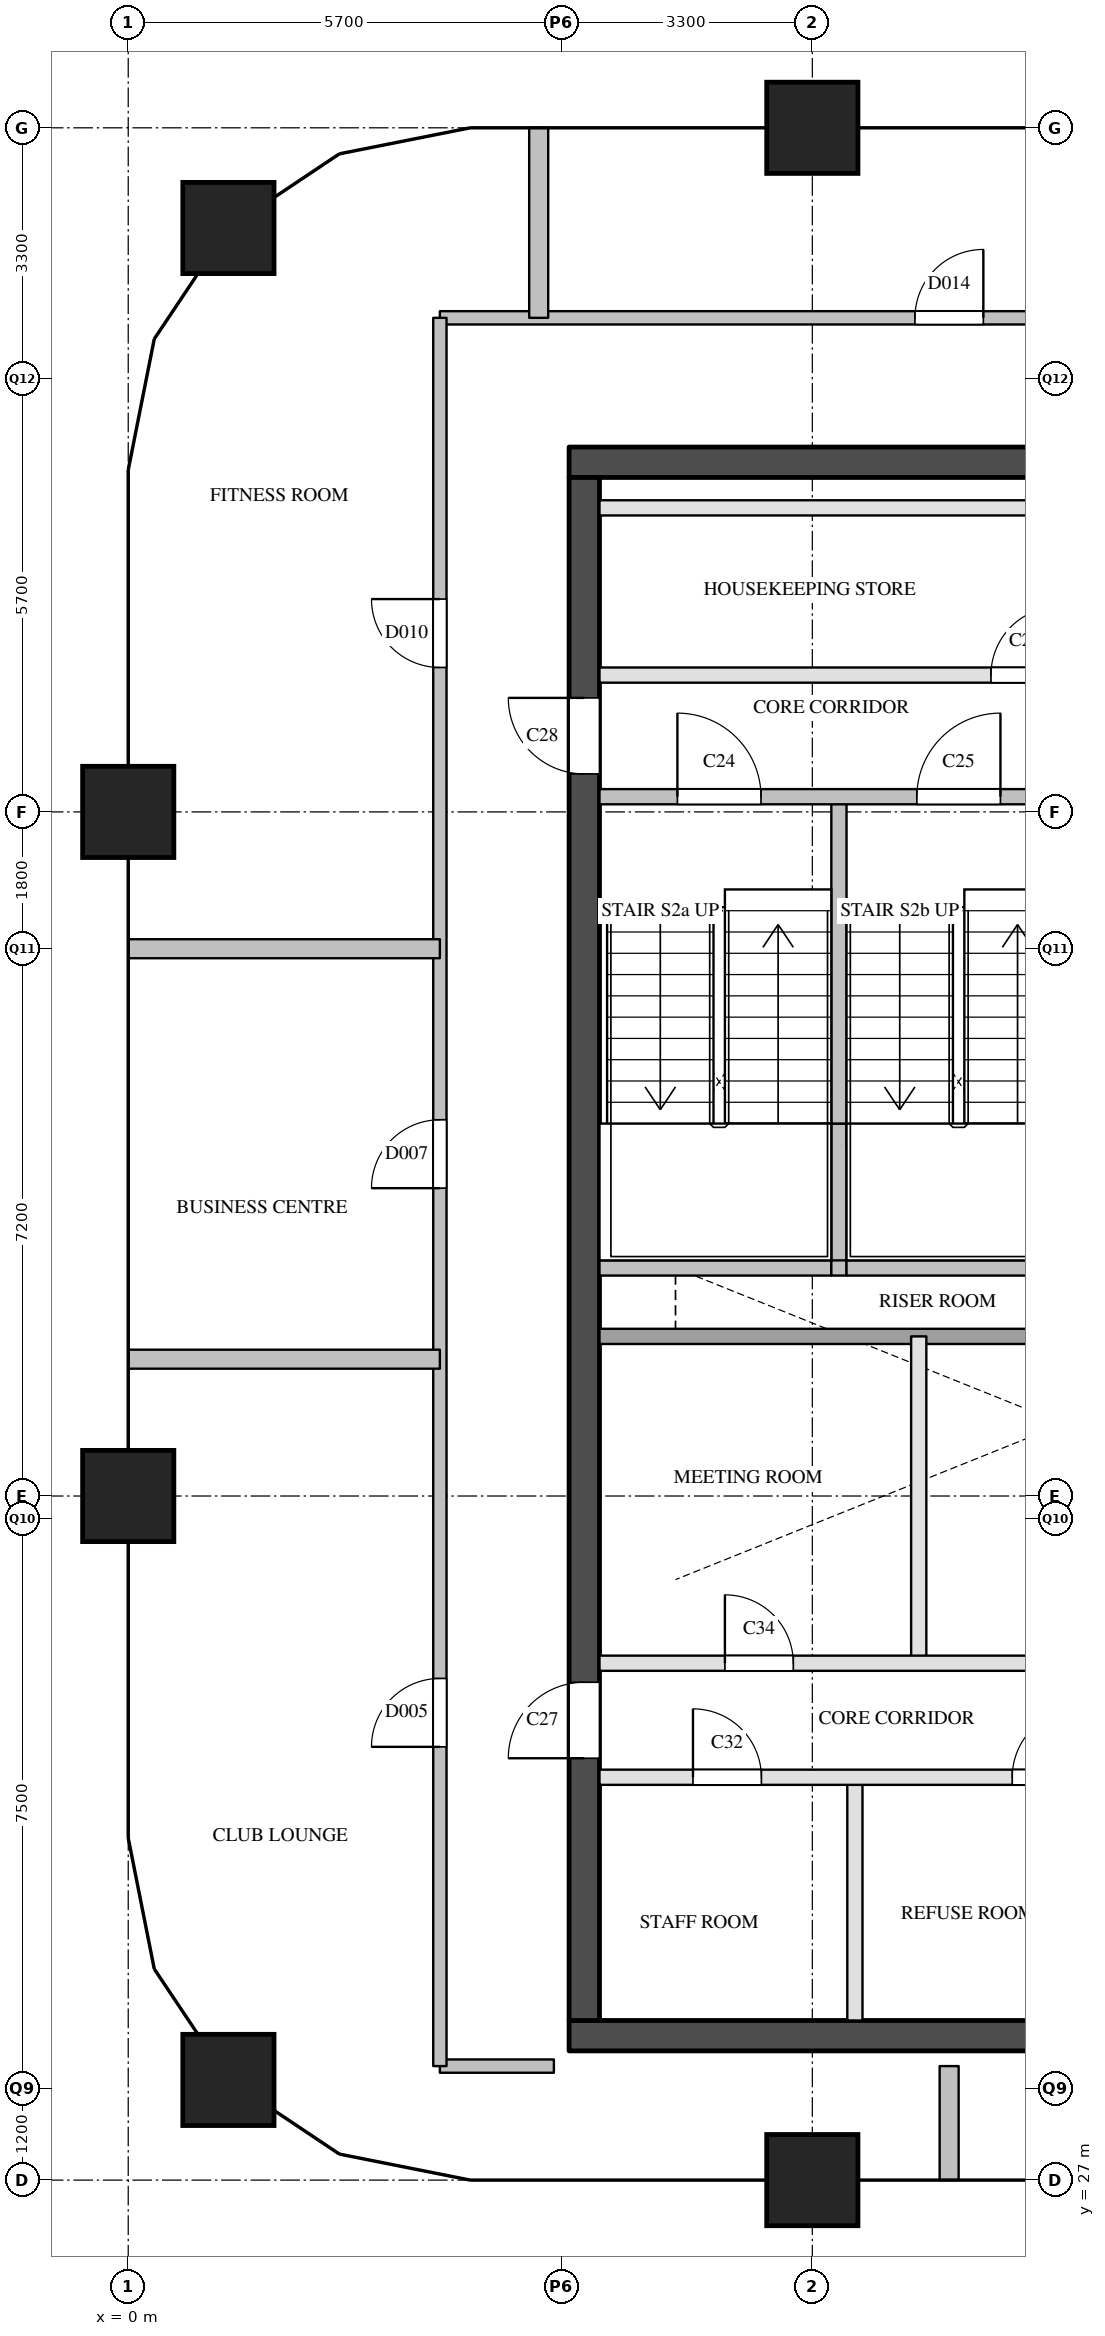
"""IFC4 building model, lengths in metres.
Left out: names, types, materials, properties, quantities, classifications, styles, units other than length and angle.
Written with IfcOpenShell. Run it as: python <this file> out.ifc"""

import sys

from ifc_helpers import new_model, si_unit, direction, frame, frame_2d, origin, origin_2d, place, context, subcontext, project, spatial, rectangle, extrude, element, fill, save


model = new_model("IFC4")
c1 = context("Model", 3, precision=1e-05, world=origin(), true_north=direction((0.0, 1.0)))
c2 = subcontext(c1, "Body", "Model", "MODEL_VIEW")
j1 = project(units=[si_unit("LENGTHUNIT", "METRE"), si_unit("PLANEANGLEUNIT", "RADIAN")], contexts=[c1])
p1 = place(None, origin())
s1 = spatial("IfcSite", under=j1, at=p1, CompositionType="ELEMENT")
p2 = place(p1, origin())
s2 = spatial("IfcBuilding", under=s1, at=p2, CompositionType="ELEMENT")
p3 = place(p2, frame((0.0, 0.0, 207.2)))
s3 = spatial("IfcBuildingStorey", under=s2, at=p3, CompositionType="ELEMENT", Elevation=207.2)
for number, where, z_axis, x_axis in (
    (1, (1.318, 28.318, 0.0), (0.0, 0.0, 1.0), (1.0, 0.0, 0.0)),
    (2, (0.0, 36.0, 0.0), (0.0, 0.0, 1.0), (1.0, 0.0, 0.0)),
    (3, (0.0, 45.0, 0.0), (0.0, 0.0, 1.0), (1.0, 0.0, 0.0)),
    (4, (1.318, 52.682, 0.0), (0.0, 0.0, 1.0), (1.0, 0.0, 0.0)),
    (5, (9.0, 27.0, 0.0), (0.0, 0.0, 1.0), (1.0, 0.0, 0.0)),
    (6, (9.0, 54.0, 0.0), (0.0, 0.0, 1.0), (1.0, 0.0, 0.0)),
):
    element("IfcColumn", number, at=place(p3, frame(where, z_axis=z_axis, x_axis=x_axis)), inside=s3, PredefinedType="COLUMN", context=c2, shape_type="SweptSolid", body=[
        extrude(rectangle(XDim=1.2, YDim=1.2, at=origin_2d()), origin(), (0.0, 0.0, 1.0), 3.9),
    ])
p4 = place(p3, frame((5.8, 28.9, 0.0), z_axis=(0.0, 0.0, 1.0), x_axis=(1.0, 0.0, 0.0)))
e7 = element("IfcWall", 7, at=p4, inside=s3, PredefinedType="SHEAR", context=c2, shape_type="SweptSolid", body=[
    extrude(rectangle(XDim=12.0, YDim=0.4, at=frame_2d((6.0, 0.0))), origin(), (0.0, 0.0, 1.0), 3.6),
])
p5 = place(p4, frame((9.25, 0.0, 0.0)))
e8 = element("IfcOpeningElement", 8, at=p5, cuts=e7, PredefinedType="OPENING", context=c2, shape_type="SweptSolid", body=[
    extrude(rectangle(XDim=1.2, YDim=2.1, at=frame_2d((0.6, 1.05))), frame((0.0, 0.21, 0.0), z_axis=(0.0, -1.0, 0.0), x_axis=(1.0, 0.0, 0.0)), (0.0, 0.0, 1.0), 0.42),
])
p6 = place(p3, frame((5.8, 49.6, 0.0), z_axis=(0.0, 0.0, 1.0), x_axis=(1.0, 0.0, 0.0)))
e9 = element("IfcWall", 9, at=p6, inside=s3, PredefinedType="SHEAR", context=c2, shape_type="SweptSolid", body=[
    extrude(rectangle(XDim=12.0, YDim=0.4, at=frame_2d((6.0, 0.0))), origin(), (0.0, 0.0, 1.0), 3.6),
])
p7 = place(p3, frame((6.0, 29.1, 0.0), z_axis=(0.0, 0.0, 1.0), x_axis=(0.0, 1.0, 0.0)))
e10 = element("IfcWall", 10, at=p7, inside=s3, PredefinedType="SHEAR", context=c2, shape_type="SweptSolid", body=[
    extrude(rectangle(XDim=20.3, YDim=0.4, at=frame_2d((10.15, 0.0))), origin(), (0.0, 0.0, 1.0), 3.6),
])
p8 = place(p7, frame((3.45, 0.0, 0.0)))
e11 = element("IfcOpeningElement", 11, at=p8, cuts=e10, PredefinedType="OPENING", context=c2, shape_type="SweptSolid", body=[
    extrude(rectangle(XDim=1.0, YDim=2.1, at=frame_2d((0.5, 1.05))), frame((0.0, 0.21, 0.0), z_axis=(0.0, -1.0, 0.0), x_axis=(1.0, 0.0, 0.0)), (0.0, 0.0, 1.0), 0.42),
])
p9 = place(p7, frame((16.4, 0.0, 0.0)))
e12 = element("IfcOpeningElement", 12, at=p9, cuts=e10, PredefinedType="OPENING", context=c2, shape_type="SweptSolid", body=[
    extrude(rectangle(XDim=1.0, YDim=2.1, at=frame_2d((0.5, 1.05))), frame((0.0, 0.21, 0.0), z_axis=(0.0, -1.0, 0.0), x_axis=(1.0, 0.0, 0.0)), (0.0, 0.0, 1.0), 0.42),
])
p10 = place(p3, frame((9.35, 39.0, 0.0), z_axis=(0.0, 0.0, 1.0), x_axis=(0.0, 1.0, 0.0)))
e13 = element("IfcWall", 13, at=p10, inside=s3, PredefinedType="SOLIDWALL", context=c2, shape_type="SweptSolid", body=[
    extrude(rectangle(XDim=1.9, YDim=0.2, at=frame_2d((0.95, 0.0))), origin(), (0.0, 0.0, 1.0), 3.6),
])
p11 = place(p3, frame((9.35, 40.9, 0.0), z_axis=(0.0, 0.0, 1.0), x_axis=(0.0, 1.0, 0.0)))
e14 = element("IfcWall", 14, at=p11, inside=s3, PredefinedType="SOLIDWALL", context=c2, shape_type="SweptSolid", body=[
    extrude(rectangle(XDim=4.3, YDim=0.2, at=frame_2d((2.15, 0.0))), origin(), (0.0, 0.0, 1.0), 3.6),
])
p12 = place(p3, frame((9.56, 29.1, 0.0), z_axis=(0.0, 0.0, 1.0), x_axis=(0.0, 1.0, 0.0)))
e15 = element("IfcWall", 15, at=p12, inside=s3, PredefinedType="PARTITIONING", context=c2, shape_type="SweptSolid", body=[
    extrude(rectangle(XDim=3.2, YDim=0.2, at=frame_2d((1.6, 0.0))), origin(), (0.0, 0.0, 1.0), 3.6),
])
p13 = place(p3, frame((10.4, 33.8, 0.0), z_axis=(0.0, 0.0, 1.0), x_axis=(0.0, 1.0, 0.0)))
e16 = element("IfcWall", 16, at=p13, inside=s3, PredefinedType="PARTITIONING", context=c2, shape_type="SweptSolid", body=[
    extrude(rectangle(XDim=4.3, YDim=0.2, at=frame_2d((2.15, 0.0))), origin(), (0.0, 0.0, 1.0), 3.6),
])
p14 = place(p3, frame((6.2, 32.3, 0.0), z_axis=(0.0, 0.0, 1.0), x_axis=(1.0, 0.0, 0.0)))
e17 = element("IfcWall", 17, at=p14, inside=s3, PredefinedType="PARTITIONING", context=c2, shape_type="SweptSolid", body=[
    extrude(rectangle(XDim=8.4, YDim=0.2, at=frame_2d((4.2, 0.0))), origin(), (0.0, 0.0, 1.0), 3.6),
])
p15 = place(p14, frame((1.23, 0.0, 0.0)))
e18 = element("IfcOpeningElement", 18, at=p15, cuts=e17, PredefinedType="OPENING", context=c2, shape_type="SweptSolid", body=[
    extrude(rectangle(XDim=0.9, YDim=2.1, at=frame_2d((0.45, 1.05))), frame((0.0, 0.11, 0.0), z_axis=(0.0, -1.0, 0.0), x_axis=(1.0, 0.0, 0.0)), (0.0, 0.0, 1.0), 0.22),
])
p16 = place(p14, frame((5.43, 0.0, 0.0)))
e19 = element("IfcOpeningElement", 19, at=p16, cuts=e17, PredefinedType="OPENING", context=c2, shape_type="SweptSolid", body=[
    extrude(rectangle(XDim=0.9, YDim=2.1, at=frame_2d((0.45, 1.05))), frame((0.0, 0.11, 0.0), z_axis=(0.0, -1.0, 0.0), x_axis=(1.0, 0.0, 0.0)), (0.0, 0.0, 1.0), 0.22),
])
p17 = place(p3, frame((6.2, 33.8, 0.0), z_axis=(0.0, 0.0, 1.0), x_axis=(1.0, 0.0, 0.0)))
e20 = element("IfcWall", 20, at=p17, inside=s3, PredefinedType="PARTITIONING", context=c2, shape_type="SweptSolid", body=[
    extrude(rectangle(XDim=8.4, YDim=0.2, at=frame_2d((4.2, 0.0))), origin(), (0.0, 0.0, 1.0), 3.6),
])
p18 = place(p17, frame((1.65, 0.0, 0.0)))
e21 = element("IfcOpeningElement", 21, at=p18, cuts=e20, PredefinedType="OPENING", context=c2, shape_type="SweptSolid", body=[
    extrude(rectangle(XDim=0.9, YDim=2.1, at=frame_2d((0.45, 1.05))), frame((0.0, 0.11, 0.0), z_axis=(0.0, -1.0, 0.0), x_axis=(1.0, 0.0, 0.0)), (0.0, 0.0, 1.0), 0.22),
])
p19 = place(p17, frame((5.85, 0.0, 0.0)))
e22 = element("IfcOpeningElement", 22, at=p19, cuts=e20, PredefinedType="OPENING", context=c2, shape_type="SweptSolid", body=[
    extrude(rectangle(XDim=0.9, YDim=2.1, at=frame_2d((0.45, 1.05))), frame((0.0, 0.11, 0.0), z_axis=(0.0, -1.0, 0.0), x_axis=(1.0, 0.0, 0.0)), (0.0, 0.0, 1.0), 0.22),
])
p20 = place(p3, frame((6.2, 38.1, 0.0), z_axis=(0.0, 0.0, 1.0), x_axis=(1.0, 0.0, 0.0)))
e23 = element("IfcWall", 23, at=p20, inside=s3, PredefinedType="SOLIDWALL", context=c2, shape_type="SweptSolid", body=[
    extrude(rectangle(XDim=11.2, YDim=0.2, at=frame_2d((5.6, 0.0))), origin(), (0.0, 0.0, 1.0), 3.6),
])
p21 = place(p20, frame((8.85, 0.0, 0.0)))
e24 = element("IfcOpeningElement", 24, at=p21, cuts=e23, PredefinedType="OPENING", context=c2, shape_type="SweptSolid", body=[
    extrude(rectangle(XDim=1.2, YDim=2.1, at=frame_2d((0.6, 1.05))), frame((0.0, 0.11, 0.0), z_axis=(0.0, -1.0, 0.0), x_axis=(1.0, 0.0, 0.0)), (0.0, 0.0, 1.0), 0.22),
])
p22 = place(p3, frame((6.2, 39.0, 0.0), z_axis=(0.0, 0.0, 1.0), x_axis=(1.0, 0.0, 0.0)))
e25 = element("IfcWall", 25, at=p22, inside=s3, PredefinedType="SOLIDWALL", context=c2, shape_type="SweptSolid", body=[
    extrude(rectangle(XDim=3.05, YDim=0.2, at=frame_2d((1.525, 0.0))), origin(), (0.0, 0.0, 1.0), 3.6),
])
p23 = place(p3, frame((9.25, 39.0, 0.0), z_axis=(0.0, 0.0, 1.0), x_axis=(1.0, 0.0, 0.0)))
e26 = element("IfcWall", 26, at=p23, inside=s3, PredefinedType="SOLIDWALL", context=c2, shape_type="SweptSolid", body=[
    extrude(rectangle(XDim=0.2, YDim=0.2, at=frame_2d((0.1, 0.0))), origin(), (0.0, 0.0, 1.0), 3.6),
])
p24 = place(p3, frame((9.45, 39.0, 0.0), z_axis=(0.0, 0.0, 1.0), x_axis=(1.0, 0.0, 0.0)))
e27 = element("IfcWall", 27, at=p24, inside=s3, PredefinedType="SOLIDWALL", context=c2, shape_type="SweptSolid", body=[
    extrude(rectangle(XDim=3.05, YDim=0.2, at=frame_2d((1.525, 0.0))), origin(), (0.0, 0.0, 1.0), 3.6),
])
p25 = place(p3, frame((6.2, 45.2, 0.0), z_axis=(0.0, 0.0, 1.0), x_axis=(1.0, 0.0, 0.0)))
e28 = element("IfcWall", 28, at=p25, inside=s3, PredefinedType="SOLIDWALL", context=c2, shape_type="SweptSolid", body=[
    extrude(rectangle(XDim=6.3, YDim=0.2, at=frame_2d((3.15, 0.0))), origin(), (0.0, 0.0, 1.0), 3.6),
])
p26 = place(p25, frame((1.025, 0.0, 0.0)))
e29 = element("IfcOpeningElement", 29, at=p26, cuts=e28, PredefinedType="OPENING", context=c2, shape_type="SweptSolid", body=[
    extrude(rectangle(XDim=1.1, YDim=2.1, at=frame_2d((0.55, 1.05))), frame((0.0, 0.11, 0.0), z_axis=(0.0, -1.0, 0.0), x_axis=(1.0, 0.0, 0.0)), (0.0, 0.0, 1.0), 0.22),
])
p27 = place(p25, frame((4.175, 0.0, 0.0)))
e30 = element("IfcOpeningElement", 30, at=p27, cuts=e28, PredefinedType="OPENING", context=c2, shape_type="SweptSolid", body=[
    extrude(rectangle(XDim=1.1, YDim=2.1, at=frame_2d((0.55, 1.05))), frame((0.0, 0.11, 0.0), z_axis=(0.0, -1.0, 0.0), x_axis=(1.0, 0.0, 0.0)), (0.0, 0.0, 1.0), 0.22),
])
p28 = place(p3, frame((6.2, 46.8, 0.0), z_axis=(0.0, 0.0, 1.0), x_axis=(1.0, 0.0, 0.0)))
e31 = element("IfcWall", 31, at=p28, inside=s3, PredefinedType="PARTITIONING", context=c2, shape_type="SweptSolid", body=[
    extrude(rectangle(XDim=11.2, YDim=0.2, at=frame_2d((5.6, 0.0))), origin(), (0.0, 0.0, 1.0), 3.6),
])
p29 = place(p28, frame((5.15, 0.0, 0.0)))
e32 = element("IfcOpeningElement", 32, at=p29, cuts=e31, PredefinedType="OPENING", context=c2, shape_type="SweptSolid", body=[
    extrude(rectangle(XDim=0.9, YDim=2.1, at=frame_2d((0.45, 1.05))), frame((0.0, 0.11, 0.0), z_axis=(0.0, -1.0, 0.0), x_axis=(1.0, 0.0, 0.0)), (0.0, 0.0, 1.0), 0.22),
])
p30 = place(p3, frame((6.2, 49.0, 0.0), z_axis=(0.0, 0.0, 1.0), x_axis=(1.0, 0.0, 0.0)))
e33 = element("IfcWall", 33, at=p30, inside=s3, PredefinedType="PARTITIONING", context=c2, shape_type="SweptSolid", body=[
    extrude(rectangle(XDim=11.2, YDim=0.2, at=frame_2d((5.6, 0.0))), origin(), (0.0, 0.0, 1.0), 3.6),
])
p31 = place(p3, frame((4.1, 28.5, 0.0), z_axis=(0.0, 0.0, 1.0), x_axis=(1.0, 0.0, 0.0)))
e34 = element("IfcWall", 34, at=p31, inside=s3, PredefinedType="PARTITIONING", context=c2, shape_type="SweptSolid", body=[
    extrude(rectangle(XDim=1.5, YDim=0.175, at=frame_2d((0.75, 0.0))), origin(), (0.0, 0.0, 1.0), 3.6),
])
p32 = place(p3, frame((4.1, 51.5, 0.0), z_axis=(0.0, 0.0, 1.0), x_axis=(1.0, 0.0, 0.0)))
e35 = element("IfcWall", 35, at=p32, inside=s3, PredefinedType="PARTITIONING", context=c2, shape_type="SweptSolid", body=[
    extrude(rectangle(XDim=15.4, YDim=0.175, at=frame_2d((7.7, 0.0))), origin(), (0.0, 0.0, 1.0), 3.6),
])
p33 = place(p32, frame((6.25, 0.0, 0.0)))
e36 = element("IfcOpeningElement", 36, at=p33, cuts=e35, PredefinedType="OPENING", context=c2, shape_type="SweptSolid", body=[
    extrude(rectangle(XDim=0.9, YDim=2.1, at=frame_2d((0.45, 1.05))), frame((0.0, 0.097, 0.0), z_axis=(0.0, -1.0, 0.0), x_axis=(1.0, 0.0, 0.0)), (0.0, 0.0, 1.0), 0.195),
])
p34 = place(p3, frame((4.1, 28.5, 0.0), z_axis=(0.0, 0.0, 1.0), x_axis=(0.0, 1.0, 0.0)))
e37 = element("IfcWall", 37, at=p34, inside=s3, PredefinedType="PARTITIONING", context=c2, shape_type="SweptSolid", body=[
    extrude(rectangle(XDim=23.0, YDim=0.175, at=frame_2d((11.5, 0.0))), origin(), (0.0, 0.0, 1.0), 3.6),
])
p35 = place(p34, frame((4.2, 0.0, 0.0)))
e38 = element("IfcOpeningElement", 38, at=p35, cuts=e37, PredefinedType="OPENING", context=c2, shape_type="SweptSolid", body=[
    extrude(rectangle(XDim=0.9, YDim=2.1, at=frame_2d((0.45, 1.05))), frame((0.0, 0.097, 0.0), z_axis=(0.0, -1.0, 0.0), x_axis=(1.0, 0.0, 0.0)), (0.0, 0.0, 1.0), 0.195),
])
p36 = place(p34, frame((11.55, 0.0, 0.0)))
e39 = element("IfcOpeningElement", 39, at=p36, cuts=e37, PredefinedType="OPENING", context=c2, shape_type="SweptSolid", body=[
    extrude(rectangle(XDim=0.9, YDim=2.1, at=frame_2d((0.45, 1.05))), frame((0.0, 0.097, 0.0), z_axis=(0.0, -1.0, 0.0), x_axis=(1.0, 0.0, 0.0)), (0.0, 0.0, 1.0), 0.195),
])
p37 = place(p34, frame((18.4, 0.0, 0.0)))
e40 = element("IfcOpeningElement", 40, at=p37, cuts=e37, PredefinedType="OPENING", context=c2, shape_type="SweptSolid", body=[
    extrude(rectangle(XDim=0.9, YDim=2.1, at=frame_2d((0.45, 1.05))), frame((0.0, 0.097, 0.0), z_axis=(0.0, -1.0, 0.0), x_axis=(1.0, 0.0, 0.0)), (0.0, 0.0, 1.0), 0.195),
])
for number, where, z_axis, x_axis in (
    (41, (0.0, 37.8, 0.0), (0.0, 0.0, 1.0), (1.0, 0.0, 0.0)),
    (42, (0.0, 43.2, 0.0), (0.0, 0.0, 1.0), (1.0, 0.0, 0.0)),
):
    element("IfcWall", number, at=place(p3, frame(where, z_axis=z_axis, x_axis=x_axis)), inside=s3, PredefinedType="PARTITIONING", context=c2, shape_type="SweptSolid", body=[
        extrude(rectangle(XDim=4.1, YDim=0.25, at=frame_2d((2.05, 0.0))), origin(), (0.0, 0.0, 1.0), 2.6),
    ])
p38 = place(p3, frame((5.4, 51.5, 0.0), z_axis=(0.0, 0.0, 1.0), x_axis=(0.0, 1.0, 0.0)))
e43 = element("IfcWall", 43, at=p38, inside=s3, PredefinedType="PARTITIONING", context=c2, shape_type="SweptSolid", body=[
    extrude(rectangle(XDim=2.5, YDim=0.25, at=frame_2d((1.25, 0.0))), origin(), (0.0, 0.0, 1.0), 2.6),
])
p39 = place(p3, frame((10.8, 27.0, 0.0), z_axis=(0.0, 0.0, 1.0), x_axis=(0.0, 1.0, 0.0)))
e44 = element("IfcWall", 44, at=p39, inside=s3, PredefinedType="PARTITIONING", context=c2, shape_type="SweptSolid", body=[
    extrude(rectangle(XDim=1.5, YDim=0.25, at=frame_2d((0.75, 0.0))), origin(), (0.0, 0.0, 1.0), 2.6),
])
p40 = place(p26, origin())
e45 = element("IfcDoor", 45, at=p40, inside=s3, OperationType="SINGLE_SWING_LEFT", PredefinedType="DOOR", context=c2, shape_type="SweptSolid", body=[
    extrude(rectangle(XDim=1.1, YDim=2.1, at=frame_2d((0.55, 1.05))), frame((0.0, 0.025, 0.0), z_axis=(0.0, -1.0, 0.0), x_axis=(1.0, 0.0, 0.0)), (0.0, 0.0, 1.0), 0.05),
])
fill(e29, e45)
p41 = place(p27, origin())
e46 = element("IfcDoor", 46, at=p41, inside=s3, OperationType="SINGLE_SWING_RIGHT", PredefinedType="DOOR", context=c2, shape_type="SweptSolid", body=[
    extrude(rectangle(XDim=1.1, YDim=2.1, at=frame_2d((0.55, 1.05))), frame((0.0, 0.025, 0.0), z_axis=(0.0, -1.0, 0.0), x_axis=(1.0, 0.0, 0.0)), (0.0, 0.0, 1.0), 0.05),
])
fill(e30, e46)
p42 = place(p8, origin())
e47 = element("IfcDoor", 47, at=p42, inside=s3, OperationType="SINGLE_SWING_LEFT", PredefinedType="DOOR", context=c2, shape_type="SweptSolid", body=[
    extrude(rectangle(XDim=1.0, YDim=2.1, at=frame_2d((0.5, 1.05))), frame((0.0, 0.025, 0.0), z_axis=(0.0, -1.0, 0.0), x_axis=(1.0, 0.0, 0.0)), (0.0, 0.0, 1.0), 0.05),
])
fill(e11, e47)
p43 = place(p9, origin())
e48 = element("IfcDoor", 48, at=p43, inside=s3, OperationType="SINGLE_SWING_RIGHT", PredefinedType="DOOR", context=c2, shape_type="SweptSolid", body=[
    extrude(rectangle(XDim=1.0, YDim=2.1, at=frame_2d((0.5, 1.05))), frame((0.0, 0.025, 0.0), z_axis=(0.0, -1.0, 0.0), x_axis=(1.0, 0.0, 0.0)), (0.0, 0.0, 1.0), 0.05),
])
fill(e12, e48)
p44 = place(p29, origin())
e49 = element("IfcDoor", 49, at=p44, inside=s3, OperationType="SINGLE_SWING_RIGHT", PredefinedType="DOOR", context=c2, shape_type="SweptSolid", body=[
    extrude(rectangle(XDim=0.9, YDim=2.1, at=frame_2d((0.45, 1.05))), frame((0.0, 0.025, 0.0), z_axis=(0.0, -1.0, 0.0), x_axis=(1.0, 0.0, 0.0)), (0.0, 0.0, 1.0), 0.05),
])
fill(e32, e49)
p45 = place(p15, origin())
e50 = element("IfcDoor", 50, at=p45, inside=s3, OperationType="SINGLE_SWING_LEFT", PredefinedType="DOOR", context=c2, shape_type="SweptSolid", body=[
    extrude(rectangle(XDim=0.9, YDim=2.1, at=frame_2d((0.45, 1.05))), frame((0.0, 0.025, 0.0), z_axis=(0.0, -1.0, 0.0), x_axis=(1.0, 0.0, 0.0)), (0.0, 0.0, 1.0), 0.05),
])
fill(e18, e50)
p46 = place(p16, origin())
e51 = element("IfcDoor", 51, at=p46, inside=s3, OperationType="SINGLE_SWING_RIGHT", PredefinedType="DOOR", context=c2, shape_type="SweptSolid", body=[
    extrude(rectangle(XDim=0.9, YDim=2.1, at=frame_2d((0.45, 1.05))), frame((0.0, 0.025, 0.0), z_axis=(0.0, -1.0, 0.0), x_axis=(1.0, 0.0, 0.0)), (0.0, 0.0, 1.0), 0.05),
])
fill(e19, e51)
p47 = place(p18, origin())
e52 = element("IfcDoor", 52, at=p47, inside=s3, OperationType="SINGLE_SWING_LEFT", PredefinedType="DOOR", context=c2, shape_type="SweptSolid", body=[
    extrude(rectangle(XDim=0.9, YDim=2.1, at=frame_2d((0.45, 1.05))), frame((0.0, 0.025, 0.0), z_axis=(0.0, -1.0, 0.0), x_axis=(1.0, 0.0, 0.0)), (0.0, 0.0, 1.0), 0.05),
])
fill(e21, e52)
p48 = place(p35, origin())
e53 = element("IfcDoor", 53, at=p48, inside=s3, OperationType="SINGLE_SWING_LEFT", PredefinedType="DOOR", context=c2, shape_type="SweptSolid", body=[
    extrude(rectangle(XDim=0.9, YDim=2.1, at=frame_2d((0.45, 1.05))), frame((0.0, 0.025, 0.0), z_axis=(0.0, -1.0, 0.0), x_axis=(1.0, 0.0, 0.0)), (0.0, 0.0, 1.0), 0.05),
])
fill(e38, e53)
p49 = place(p36, origin())
e54 = element("IfcDoor", 54, at=p49, inside=s3, OperationType="SINGLE_SWING_LEFT", PredefinedType="DOOR", context=c2, shape_type="SweptSolid", body=[
    extrude(rectangle(XDim=0.9, YDim=2.1, at=frame_2d((0.45, 1.05))), frame((0.0, 0.025, 0.0), z_axis=(0.0, -1.0, 0.0), x_axis=(1.0, 0.0, 0.0)), (0.0, 0.0, 1.0), 0.05),
])
fill(e39, e54)
p50 = place(p37, origin())
e55 = element("IfcDoor", 55, at=p50, inside=s3, OperationType="SINGLE_SWING_RIGHT", PredefinedType="DOOR", context=c2, shape_type="SweptSolid", body=[
    extrude(rectangle(XDim=0.9, YDim=2.1, at=frame_2d((0.45, 1.05))), frame((0.0, 0.025, 0.0), z_axis=(0.0, -1.0, 0.0), x_axis=(1.0, 0.0, 0.0)), (0.0, 0.0, 1.0), 0.05),
])
fill(e40, e55)
p51 = place(p33, origin())
e56 = element("IfcDoor", 56, at=p51, inside=s3, OperationType="SINGLE_SWING_RIGHT", PredefinedType="DOOR", context=c2, shape_type="SweptSolid", body=[
    extrude(rectangle(XDim=0.9, YDim=2.1, at=frame_2d((0.45, 1.05))), frame((0.0, 0.025, 0.0), z_axis=(0.0, -1.0, 0.0), x_axis=(1.0, 0.0, 0.0)), (0.0, 0.0, 1.0), 0.05),
])
fill(e36, e56)
save(model, sys.argv[1])
